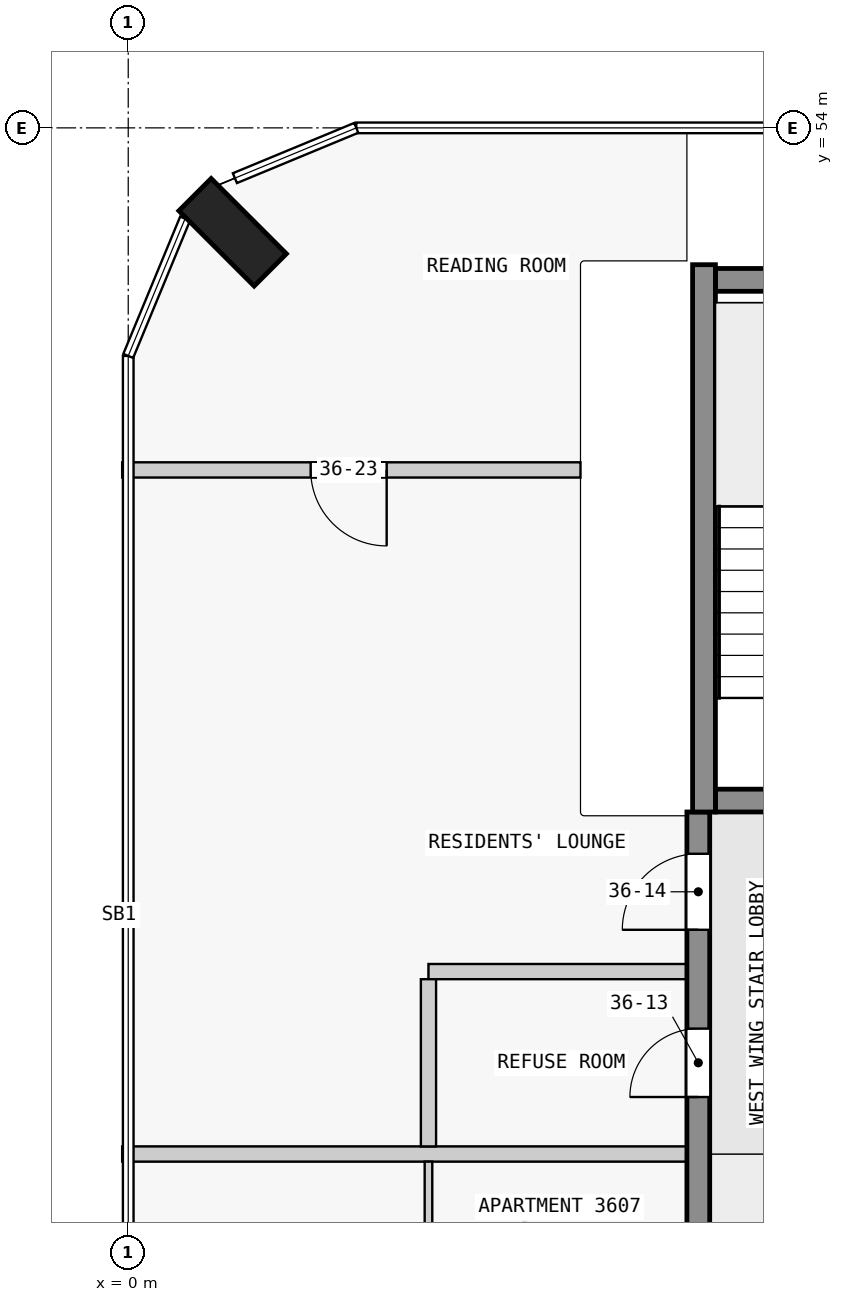
"""IFC4 building model, lengths in metres.
Left out: names, types, materials, properties, quantities, classifications, styles, units other than length and angle.
Written with IfcOpenShell. Run it as: python <this file> out.ifc"""

import sys

from ifc_helpers import new_model, si_unit, direction, frame, frame_2d, origin, origin_2d, place, context, subcontext, project, spatial, rectangle, extrude, element, fill, save


model = new_model("IFC4")
c1 = context("Model", 3, precision=1e-05, world=origin(), true_north=direction((0.0, 1.0)))
c2 = subcontext(c1, "Body", "Model", "MODEL_VIEW")
j1 = project(units=[si_unit("LENGTHUNIT", "METRE"), si_unit("PLANEANGLEUNIT", "RADIAN")], contexts=[c1])
p1 = place(None, origin())
s1 = spatial("IfcSite", under=j1, at=p1, CompositionType="ELEMENT")
p2 = place(p1, origin())
s2 = spatial("IfcBuilding", under=s1, at=p2, CompositionType="ELEMENT")
p3 = place(p2, frame((0.0, 0.0, 142.9)))
s3 = spatial("IfcBuildingStorey", under=s2, at=p3, CompositionType="ELEMENT", Elevation=142.9)
p4 = place(p3, frame((1.374, 52.626, 0.0), z_axis=(0.0, 0.0, 1.0), x_axis=(0.707106781187, 0.707106781187, 0.0)))
e1 = element("IfcColumn", 1, at=p4, inside=s3, PredefinedType="COLUMN", context=c2, shape_type="SweptSolid", body=[
    extrude(rectangle(XDim=0.6, YDim=1.4, at=origin_2d()), origin(), (0.0, 0.0, 1.0), 3.5),
])
p5 = place(p3, frame((7.725, 45.15, 0.0), z_axis=(0.0, 0.0, 1.0), x_axis=(1.0, 0.0, 0.0)))
e2 = element("IfcWall", 2, at=p5, inside=s3, PredefinedType="SHEAR", context=c2, shape_type="SweptSolid", body=[
    extrude(rectangle(XDim=2.55, YDim=0.3, at=frame_2d((1.275, 0.0))), origin(), (0.0, 0.0, 1.0), 3.5),
])
p6 = place(p5, frame((0.725, 0.0, 0.0)))
e3 = element("IfcOpeningElement", 3, at=p6, cuts=e2, PredefinedType="OPENING", context=c2, shape_type="SweptSolid", body=[
    extrude(rectangle(XDim=1.1, YDim=2.1, at=frame_2d((0.55, 1.05))), frame((0.0, 0.16, 0.0), z_axis=(0.0, -1.0, 0.0), x_axis=(1.0, 0.0, 0.0)), (0.0, 0.0, 1.0), 0.32),
])
p7 = place(p3, frame((7.725, 52.0, 0.0), z_axis=(0.0, 0.0, 1.0), x_axis=(1.0, 0.0, 0.0)))
e4 = element("IfcWall", 4, at=p7, inside=s3, PredefinedType="SHEAR", context=c2, shape_type="SweptSolid", body=[
    extrude(rectangle(XDim=2.55, YDim=0.3, at=frame_2d((1.275, 0.0))), origin(), (0.0, 0.0, 1.0), 3.5),
])
p8 = place(p3, frame((7.575, 45.0, 0.0), z_axis=(0.0, 0.0, 1.0), x_axis=(0.0, 1.0, 0.0)))
e5 = element("IfcWall", 5, at=p8, inside=s3, PredefinedType="SHEAR", context=c2, shape_type="SweptSolid", body=[
    extrude(rectangle(XDim=7.2, YDim=0.3, at=frame_2d((3.6, 0.0))), origin(), (0.0, 0.0, 1.0), 3.5),
])
p9 = place(p3, frame((7.5, 18.0, 0.0), z_axis=(0.0, 0.0, 1.0), x_axis=(0.0, 1.0, 0.0)))
e6 = element("IfcWall", 6, at=p9, inside=s3, PredefinedType="SHEAR", context=c2, shape_type="SweptSolid", body=[
    extrude(rectangle(XDim=27.0, YDim=0.3, at=frame_2d((13.5, 0.0))), origin(), (0.0, 0.0, 1.0), 3.25),
])
p10 = place(p9, frame((4.05, 0.0, 0.0)))
e7 = element("IfcOpeningElement", 7, at=p10, cuts=e6, PredefinedType="OPENING", context=c2, shape_type="SweptSolid", body=[
    extrude(rectangle(XDim=1.0, YDim=2.1, at=frame_2d((0.5, 1.05))), frame((0.0, 0.16, 0.0), z_axis=(0.0, -1.0, 0.0), x_axis=(1.0, 0.0, 0.0)), (0.0, 0.0, 1.0), 0.32),
])
p11 = place(p9, frame((10.75, 0.0, 0.0)))
e8 = element("IfcOpeningElement", 8, at=p11, cuts=e6, PredefinedType="OPENING", context=c2, shape_type="SweptSolid", body=[
    extrude(rectangle(XDim=1.0, YDim=2.1, at=frame_2d((0.5, 1.05))), frame((0.0, 0.16, 0.0), z_axis=(0.0, -1.0, 0.0), x_axis=(1.0, 0.0, 0.0)), (0.0, 0.0, 1.0), 0.32),
])
p12 = place(p9, frame((17.55, 0.0, 0.0)))
e9 = element("IfcOpeningElement", 9, at=p12, cuts=e6, PredefinedType="OPENING", context=c2, shape_type="SweptSolid", body=[
    extrude(rectangle(XDim=1.0, YDim=2.1, at=frame_2d((0.5, 1.05))), frame((0.0, 0.16, 0.0), z_axis=(0.0, -1.0, 0.0), x_axis=(1.0, 0.0, 0.0)), (0.0, 0.0, 1.0), 0.32),
])
p13 = place(p9, frame((23.25, 0.0, 0.0)))
e10 = element("IfcOpeningElement", 10, at=p13, cuts=e6, PredefinedType="OPENING", context=c2, shape_type="SweptSolid", body=[
    extrude(rectangle(XDim=0.9, YDim=2.1, at=frame_2d((0.45, 1.05))), frame((0.0, 0.16, 0.0), z_axis=(0.0, -1.0, 0.0), x_axis=(1.0, 0.0, 0.0)), (0.0, 0.0, 1.0), 0.32),
])
p14 = place(p9, frame((25.45, 0.0, 0.0)))
e11 = element("IfcOpeningElement", 11, at=p14, cuts=e6, PredefinedType="OPENING", context=c2, shape_type="SweptSolid", body=[
    extrude(rectangle(XDim=1.0, YDim=2.1, at=frame_2d((0.5, 1.05))), frame((0.0, 0.16, 0.0), z_axis=(0.0, -1.0, 0.0), x_axis=(1.0, 0.0, 0.0)), (0.0, 0.0, 1.0), 0.32),
])
p15 = place(p3, frame((7.35, 40.5, 0.0), z_axis=(0.0, 0.0, 1.0), x_axis=(-1.0, 0.0, 0.0)))
e12 = element("IfcWall", 12, at=p15, inside=s3, PredefinedType="PARTITIONING", context=c2, shape_type="SweptSolid", body=[
    extrude(rectangle(XDim=7.43, YDim=0.2, at=frame_2d((3.715, 0.0))), origin(), (0.0, 0.0, 1.0), 3.25),
])
p16 = place(p3, frame((7.35, 42.9, 0.0), z_axis=(0.0, 0.0, 1.0), x_axis=(-1.0, 0.0, 0.0)))
e13 = element("IfcWall", 13, at=p16, inside=s3, PredefinedType="PARTITIONING", context=c2, shape_type="SweptSolid", body=[
    extrude(rectangle(XDim=3.4, YDim=0.2, at=frame_2d((1.7, 0.0))), origin(), (0.0, 0.0, 1.0), 3.25),
])
p17 = place(p3, frame((5.95, 49.5, 0.0), z_axis=(0.0, 0.0, 1.0), x_axis=(-1.0, 0.0, 0.0)))
e14 = element("IfcWall", 14, at=p17, inside=s3, PredefinedType="PARTITIONING", context=c2, shape_type="SweptSolid", body=[
    extrude(rectangle(XDim=6.03, YDim=0.2, at=frame_2d((3.015, 0.0))), origin(), (0.0, 0.0, 1.0), 3.25),
])
p18 = place(p17, frame((2.55, 0.0, 0.0)))
e15 = element("IfcOpeningElement", 15, at=p18, cuts=e14, PredefinedType="OPENING", context=c2, shape_type="SweptSolid", body=[
    extrude(rectangle(XDim=1.0, YDim=2.1, at=frame_2d((0.5, 1.05))), frame((0.0, 0.11, 0.0), z_axis=(0.0, -1.0, 0.0), x_axis=(1.0, 0.0, 0.0)), (0.0, 0.0, 1.0), 0.22),
])
p19 = place(p3, frame((3.95, 40.4, 0.0), z_axis=(0.0, 0.0, 1.0), x_axis=(0.0, -1.0, 0.0)))
e16 = element("IfcWall", 16, at=p19, inside=s3, PredefinedType="PARTITIONING", context=c2, shape_type="SweptSolid", body=[
    extrude(rectangle(XDim=1.65, YDim=0.1, at=frame_2d((0.825, 0.0))), origin(), (0.0, 0.0, 1.0), 3.25),
])
p20 = place(p3, frame((3.95, 42.8, 0.0), z_axis=(0.0, 0.0, 1.0), x_axis=(0.0, -1.0, 0.0)))
e17 = element("IfcWall", 17, at=p20, inside=s3, PredefinedType="PARTITIONING", context=c2, shape_type="SweptSolid", body=[
    extrude(rectangle(XDim=2.2, YDim=0.2, at=frame_2d((1.1, 0.0))), origin(), (0.0, 0.0, 1.0), 3.25),
])
p21 = place(p13, origin())
e18 = element("IfcDoor", 18, at=p21, inside=s3, OperationType="SINGLE_SWING_RIGHT", PredefinedType="DOOR", context=c2, shape_type="SweptSolid", body=[
    extrude(rectangle(XDim=0.9, YDim=2.1, at=frame_2d((0.45, 1.05))), frame((0.0, 0.025, 0.0), z_axis=(0.0, -1.0, 0.0), x_axis=(1.0, 0.0, 0.0)), (0.0, 0.0, 1.0), 0.05),
])
fill(e10, e18)
p22 = place(p14, origin())
e19 = element("IfcDoor", 19, at=p22, inside=s3, OperationType="SINGLE_SWING_RIGHT", PredefinedType="DOOR", context=c2, shape_type="SweptSolid", body=[
    extrude(rectangle(XDim=1.0, YDim=2.1, at=frame_2d((0.5, 1.05))), frame((0.0, 0.025, 0.0), z_axis=(0.0, -1.0, 0.0), x_axis=(1.0, 0.0, 0.0)), (0.0, 0.0, 1.0), 0.05),
])
fill(e11, e19)
p23 = place(p18, origin())
e20 = element("IfcDoor", 20, at=p23, inside=s3, OperationType="SINGLE_SWING_RIGHT", PredefinedType="DOOR", context=c2, shape_type="SweptSolid", body=[
    extrude(rectangle(XDim=1.0, YDim=2.1, at=frame_2d((0.5, 1.05))), frame((0.0, 0.025, 0.0), z_axis=(0.0, -1.0, 0.0), x_axis=(1.0, 0.0, 0.0)), (0.0, 0.0, 1.0), 0.05),
])
fill(e15, e20)
save(model, sys.argv[1])
